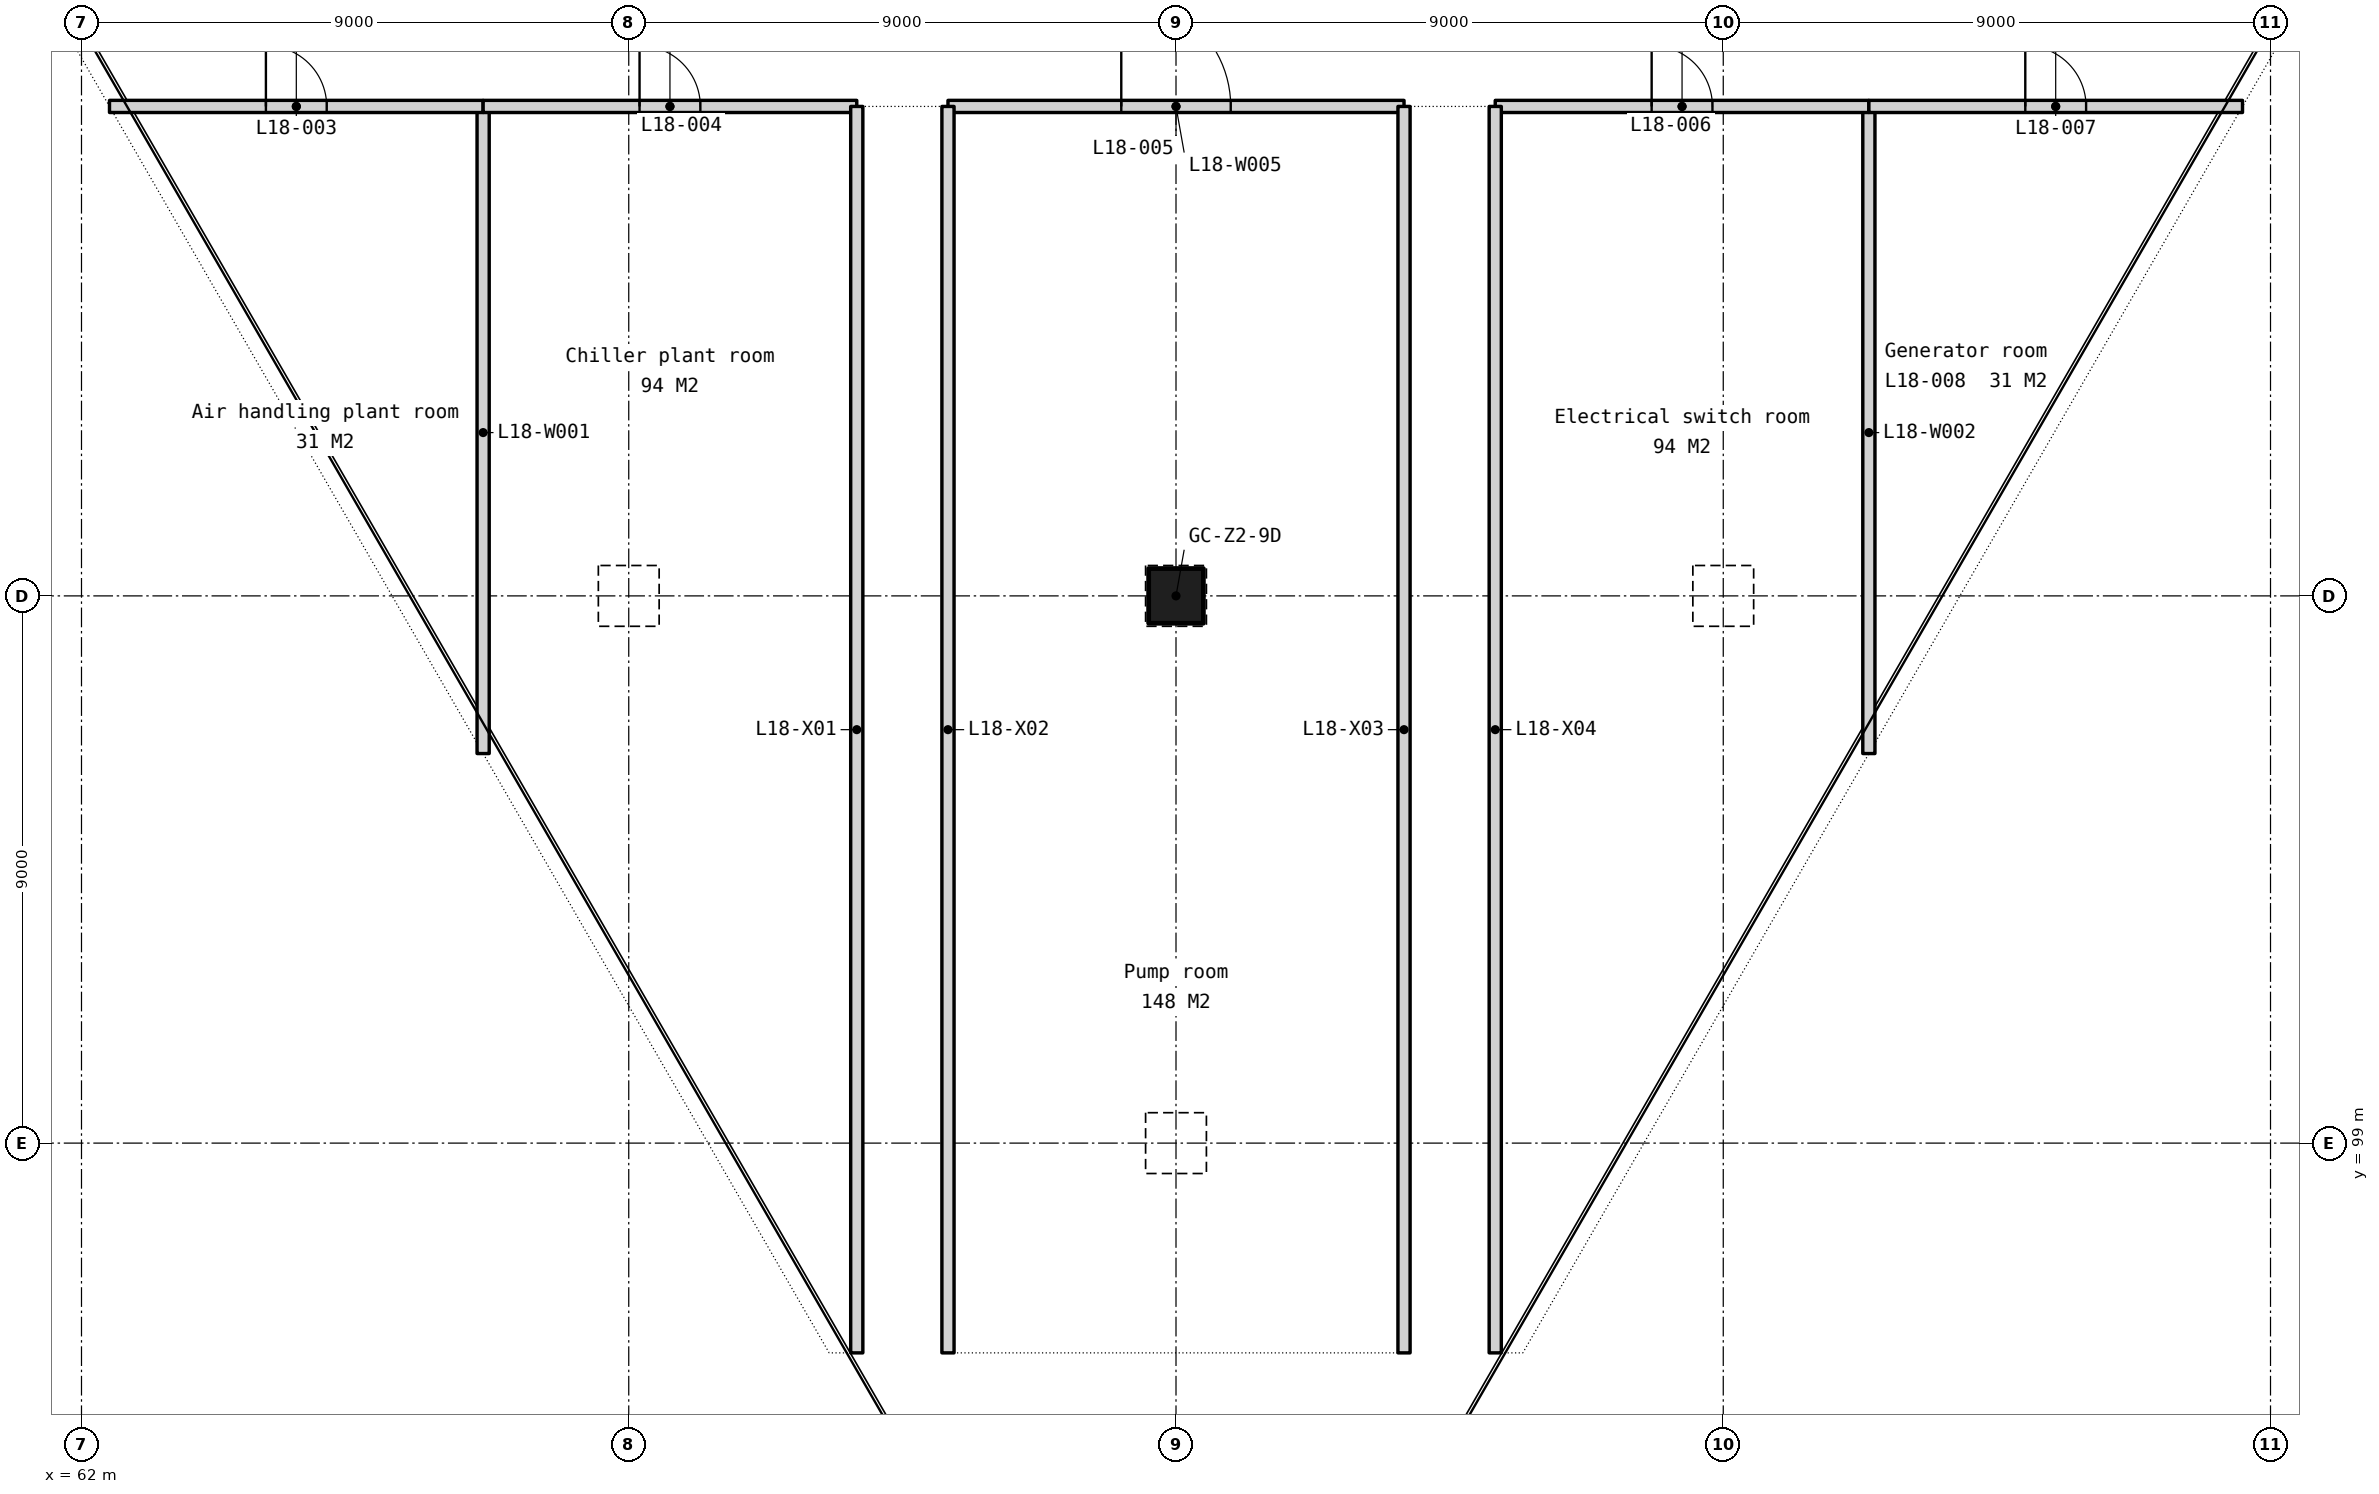
"""IFC4 building model, lengths in metres.
Left out: names, types, materials, properties, quantities, classifications, styles, units other than length and angle.
Written with IfcOpenShell. Run it as: python <this file> out.ifc"""

import sys

from ifc_helpers import new_model, si_unit, direction, frame, frame_2d, origin, origin_2d, place, context, subcontext, project, spatial, rectangle, extrude, element, fill, save


model = new_model("IFC4")
c1 = context("Model", 3, precision=1e-05, world=origin(), true_north=direction((0.0, 1.0)))
c2 = subcontext(c1, "Body", "Model", "MODEL_VIEW")
j1 = project(units=[si_unit("LENGTHUNIT", "METRE"), si_unit("PLANEANGLEUNIT", "RADIAN")], contexts=[c1])
p1 = place(None, origin())
s1 = spatial("IfcSite", under=j1, at=p1, CompositionType="ELEMENT")
p2 = place(p1, origin())
s2 = spatial("IfcBuilding", under=s1, at=p2, CompositionType="ELEMENT")
p3 = place(p2, frame((0.0, 0.0, 77.0)))
s3 = spatial("IfcBuildingStorey", under=s2, at=p3, CompositionType="ELEMENT", Elevation=77.0)
p4 = place(p3, frame((80.0, 108.0, 0.0), z_axis=(0.0, 0.0, 1.0), x_axis=(1.0, 0.0, 0.0)))
e1 = element("IfcColumn", 1, at=p4, inside=s3, PredefinedType="COLUMN", context=c2, shape_type="SweptSolid", body=[
    extrude(rectangle(XDim=0.9, YDim=0.9, at=origin_2d()), origin(), (0.0, 0.0, 1.0), 4.8),
])
for number, where, z_axis, x_axis in (
    (2, (68.605, 105.407, 0.0), (0.0, 0.0, 1.0), (0.0, 1.0, 0.0)),
    (3, (91.395, 105.407, 0.0), (0.0, 0.0, 1.0), (0.0, 1.0, 0.0)),
):
    element("IfcWall", number, at=place(p3, frame(where, z_axis=z_axis, x_axis=x_axis)), inside=s3, PredefinedType="PARTITIONING", context=c2, shape_type="SweptSolid", body=[
        extrude(rectangle(XDim=10.558, YDim=0.2, at=frame_2d((5.279, 0.0))), origin(), (0.0, 0.0, 1.0), 4.35),
    ])
p5 = place(p3, frame((62.46, 116.05, 0.0), z_axis=(0.0, 0.0, 1.0), x_axis=(1.0, 0.0, 0.0)))
e4 = element("IfcWall", 4, at=p5, inside=s3, PredefinedType="PARTITIONING", context=c2, shape_type="SweptSolid", body=[
    extrude(rectangle(XDim=6.145, YDim=0.2, at=frame_2d((3.072, 0.0))), origin(), (0.0, 0.0, 1.0), 4.35),
])
p6 = place(p5, frame((2.573, 0.0, 0.0)))
e5 = element("IfcOpeningElement", 5, at=p6, cuts=e4, PredefinedType="OPENING", context=c2, shape_type="SweptSolid", body=[
    extrude(rectangle(XDim=1.0, YDim=2.1, at=frame_2d((0.5, 1.05))), frame((0.0, 0.11, 0.0), z_axis=(0.0, -1.0, 0.0), x_axis=(1.0, 0.0, 0.0)), (0.0, 0.0, 1.0), 0.22),
])
p7 = place(p3, frame((68.605, 116.05, 0.0), z_axis=(0.0, 0.0, 1.0), x_axis=(1.0, 0.0, 0.0)))
e6 = element("IfcWall", 6, at=p7, inside=s3, PredefinedType="PARTITIONING", context=c2, shape_type="SweptSolid", body=[
    extrude(rectangle(XDim=6.145, YDim=0.2, at=frame_2d((3.072, 0.0))), origin(), (0.0, 0.0, 1.0), 4.35),
])
p8 = place(p7, frame((2.573, 0.0, 0.0)))
e7 = element("IfcOpeningElement", 7, at=p8, cuts=e6, PredefinedType="OPENING", context=c2, shape_type="SweptSolid", body=[
    extrude(rectangle(XDim=1.0, YDim=2.1, at=frame_2d((0.5, 1.05))), frame((0.0, 0.11, 0.0), z_axis=(0.0, -1.0, 0.0), x_axis=(1.0, 0.0, 0.0)), (0.0, 0.0, 1.0), 0.22),
])
p9 = place(p3, frame((76.25, 116.05, 0.0), z_axis=(0.0, 0.0, 1.0), x_axis=(1.0, 0.0, 0.0)))
e8 = element("IfcWall", 8, at=p9, inside=s3, PredefinedType="PARTITIONING", context=c2, shape_type="SweptSolid", body=[
    extrude(rectangle(XDim=7.5, YDim=0.2, at=frame_2d((3.75, 0.0))), origin(), (0.0, 0.0, 1.0), 4.35),
])
p10 = place(p9, frame((2.85, 0.0, 0.0)))
e9 = element("IfcOpeningElement", 9, at=p10, cuts=e8, PredefinedType="OPENING", context=c2, shape_type="SweptSolid", body=[
    extrude(rectangle(XDim=1.8, YDim=2.1, at=frame_2d((0.9, 1.05))), frame((0.0, 0.11, 0.0), z_axis=(0.0, -1.0, 0.0), x_axis=(1.0, 0.0, 0.0)), (0.0, 0.0, 1.0), 0.22),
])
p11 = place(p3, frame((85.25, 116.05, 0.0), z_axis=(0.0, 0.0, 1.0), x_axis=(1.0, 0.0, 0.0)))
e10 = element("IfcWall", 10, at=p11, inside=s3, PredefinedType="PARTITIONING", context=c2, shape_type="SweptSolid", body=[
    extrude(rectangle(XDim=6.145, YDim=0.2, at=frame_2d((3.072, 0.0))), origin(), (0.0, 0.0, 1.0), 4.35),
])
p12 = place(p11, frame((2.573, 0.0, 0.0)))
e11 = element("IfcOpeningElement", 11, at=p12, cuts=e10, PredefinedType="OPENING", context=c2, shape_type="SweptSolid", body=[
    extrude(rectangle(XDim=1.0, YDim=2.1, at=frame_2d((0.5, 1.05))), frame((0.0, 0.11, 0.0), z_axis=(0.0, -1.0, 0.0), x_axis=(1.0, 0.0, 0.0)), (0.0, 0.0, 1.0), 0.22),
])
p13 = place(p3, frame((91.395, 116.05, 0.0), z_axis=(0.0, 0.0, 1.0), x_axis=(1.0, 0.0, 0.0)))
e12 = element("IfcWall", 12, at=p13, inside=s3, PredefinedType="PARTITIONING", context=c2, shape_type="SweptSolid", body=[
    extrude(rectangle(XDim=6.145, YDim=0.2, at=frame_2d((3.072, 0.0))), origin(), (0.0, 0.0, 1.0), 4.35),
])
p14 = place(p13, frame((2.573, 0.0, 0.0)))
e13 = element("IfcOpeningElement", 13, at=p14, cuts=e12, PredefinedType="OPENING", context=c2, shape_type="SweptSolid", body=[
    extrude(rectangle(XDim=1.0, YDim=2.1, at=frame_2d((0.5, 1.05))), frame((0.0, 0.11, 0.0), z_axis=(0.0, -1.0, 0.0), x_axis=(1.0, 0.0, 0.0)), (0.0, 0.0, 1.0), 0.22),
])
for number, where, z_axis, x_axis in (
    (14, (74.75, 95.55, 0.0), (0.0, 0.0, 1.0), (0.0, 1.0, 0.0)),
    (15, (76.25, 95.55, 0.0), (0.0, 0.0, 1.0), (0.0, 1.0, 0.0)),
    (16, (83.75, 95.55, 0.0), (0.0, 0.0, 1.0), (0.0, 1.0, 0.0)),
    (17, (85.25, 95.55, 0.0), (0.0, 0.0, 1.0), (0.0, 1.0, 0.0)),
):
    element("IfcWall", number, at=place(p3, frame(where, z_axis=z_axis, x_axis=x_axis)), inside=s3, PredefinedType="PARTITIONING", context=c2, shape_type="SweptSolid", body=[
        extrude(rectangle(XDim=20.5, YDim=0.2, at=frame_2d((10.25, 0.0))), origin(), (0.0, 0.0, 1.0), 4.35),
    ])
p15 = place(p6, origin())
e18 = element("IfcDoor", 18, at=p15, inside=s3, OperationType="SINGLE_SWING_LEFT", PredefinedType="DOOR", context=c2, shape_type="SweptSolid", body=[
    extrude(rectangle(XDim=1.0, YDim=2.1, at=frame_2d((0.5, 1.05))), frame((0.0, 0.025, 0.0), z_axis=(0.0, -1.0, 0.0), x_axis=(1.0, 0.0, 0.0)), (0.0, 0.0, 1.0), 0.05),
])
fill(e5, e18)
p16 = place(p8, origin())
e19 = element("IfcDoor", 19, at=p16, inside=s3, OperationType="SINGLE_SWING_LEFT", PredefinedType="DOOR", context=c2, shape_type="SweptSolid", body=[
    extrude(rectangle(XDim=1.0, YDim=2.1, at=frame_2d((0.5, 1.05))), frame((0.0, 0.025, 0.0), z_axis=(0.0, -1.0, 0.0), x_axis=(1.0, 0.0, 0.0)), (0.0, 0.0, 1.0), 0.05),
])
fill(e7, e19)
p17 = place(p10, origin())
e20 = element("IfcDoor", 20, at=p17, inside=s3, OperationType="SINGLE_SWING_LEFT", PredefinedType="DOOR", context=c2, shape_type="SweptSolid", body=[
    extrude(rectangle(XDim=1.8, YDim=2.1, at=frame_2d((0.9, 1.05))), frame((0.0, 0.025, 0.0), z_axis=(0.0, -1.0, 0.0), x_axis=(1.0, 0.0, 0.0)), (0.0, 0.0, 1.0), 0.05),
])
fill(e9, e20)
p18 = place(p12, origin())
e21 = element("IfcDoor", 21, at=p18, inside=s3, OperationType="SINGLE_SWING_LEFT", PredefinedType="DOOR", context=c2, shape_type="SweptSolid", body=[
    extrude(rectangle(XDim=1.0, YDim=2.1, at=frame_2d((0.5, 1.05))), frame((0.0, 0.025, 0.0), z_axis=(0.0, -1.0, 0.0), x_axis=(1.0, 0.0, 0.0)), (0.0, 0.0, 1.0), 0.05),
])
fill(e11, e21)
p19 = place(p14, origin())
e22 = element("IfcDoor", 22, at=p19, inside=s3, OperationType="SINGLE_SWING_LEFT", PredefinedType="DOOR", context=c2, shape_type="SweptSolid", body=[
    extrude(rectangle(XDim=1.0, YDim=2.1, at=frame_2d((0.5, 1.05))), frame((0.0, 0.025, 0.0), z_axis=(0.0, -1.0, 0.0), x_axis=(1.0, 0.0, 0.0)), (0.0, 0.0, 1.0), 0.05),
])
fill(e13, e22)
save(model, sys.argv[1])
